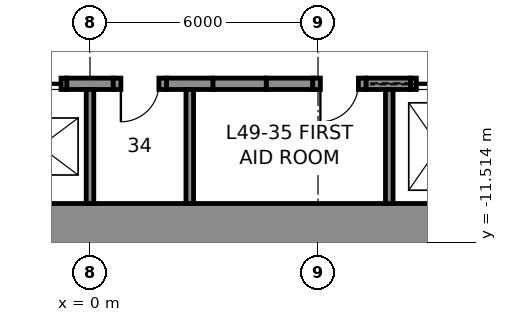
"""IFC4 building model, lengths in metres.
Left out: names, types, materials, properties, quantities, classifications, styles, units other than length and angle.
Written with IfcOpenShell. Run it as: python <this file> out.ifc"""

import sys

from ifc_helpers import new_model, si_unit, direction, frame, frame_2d, origin, place, context, subcontext, project, spatial, rectangle, extrude, element, fill, save


model = new_model("IFC4")
c1 = context("Model", 3, precision=1e-05, world=origin(), true_north=direction((0.0, 1.0)))
c2 = subcontext(c1, "Body", "Model", "MODEL_VIEW")
j1 = project(units=[si_unit("LENGTHUNIT", "METRE"), si_unit("PLANEANGLEUNIT", "RADIAN")], contexts=[c1])
p1 = place(None, origin())
s1 = spatial("IfcSite", under=j1, at=p1, CompositionType="ELEMENT")
p2 = place(p1, origin())
s2 = spatial("IfcBuilding", under=s1, at=p2, CompositionType="ELEMENT")
p3 = place(p2, frame((0.0, 0.0, 225.8)))
s3 = spatial("IfcBuildingStorey", under=s2, at=p3, CompositionType="ELEMENT", Elevation=225.8)
p4 = place(p3, frame((12.0, -11.25, 0.0), z_axis=(0.0, 0.0, 1.0), x_axis=(-1.0, 0.0, 0.0)))
e1 = element("IfcWall", 1, at=p4, inside=s3, PredefinedType="SHEAR", context=c2, shape_type="SweptSolid", body=[
    extrude(rectangle(XDim=24.0, YDim=1.5, at=frame_2d((12.0, 0.0))), origin(), (0.0, 0.0, 1.0), 4.0),
])
for number, where, z_axis, x_axis in (
    (2, (-0.613, -7.35, 0.0), (0.0, 0.0, 1.0), (1.0, 0.0, 0.0)),
    (3, (2.012, -7.35, 0.0), (0.0, 0.0, 1.0), (1.0, 0.0, 0.0)),
    (4, (4.637, -7.35, 0.0), (0.0, 0.0, 1.0), (1.0, 0.0, 0.0)),
):
    element("IfcWall", number, at=place(p3, frame(where, z_axis=z_axis, x_axis=x_axis)), inside=s3, PredefinedType="SHEAR", context=c2, shape_type="SweptSolid", body=[
        extrude(rectangle(XDim=1.225, YDim=0.3, at=frame_2d((0.613, 0.0))), origin(), (0.0, 0.0, 1.0), 4.0),
    ])
p5 = place(p3, frame((7.262, -7.35, 0.0), z_axis=(0.0, 0.0, 1.0), x_axis=(1.0, 0.0, 0.0)))
e5 = element("IfcWall", 5, at=p5, inside=s3, PredefinedType="SHEAR", context=c2, shape_type="SweptSolid", body=[
    extrude(rectangle(XDim=1.175, YDim=0.3, at=frame_2d((0.587, 0.0))), origin(), (0.0, 0.0, 1.0), 4.0),
])
p6 = place(p3, frame((-2.012, -7.35, 0.0), z_axis=(0.0, 0.0, 1.0), x_axis=(1.0, 0.0, 0.0)))
e6 = element("IfcWall", 6, at=p6, inside=s3, PredefinedType="PARTITIONING", context=c2, shape_type="SweptSolid", body=[
    extrude(rectangle(XDim=1.4, YDim=0.3, at=frame_2d((0.7, 0.0))), origin(), (0.0, 0.0, 1.0), 4.0),
])
p7 = place(p6, frame((0.15, 0.0, 0.0)))
e7 = element("IfcOpeningElement", 7, at=p7, cuts=e6, PredefinedType="OPENING", context=c2, shape_type="SweptSolid", body=[
    extrude(rectangle(XDim=1.1, YDim=2.3, at=frame_2d((0.55, 1.15))), frame((0.0, 0.16, 0.0), z_axis=(0.0, -1.0, 0.0), x_axis=(1.0, 0.0, 0.0)), (0.0, 0.0, 1.0), 0.32),
])
p8 = place(p3, frame((0.613, -7.35, 0.0), z_axis=(0.0, 0.0, 1.0), x_axis=(1.0, 0.0, 0.0)))
e8 = element("IfcWall", 8, at=p8, inside=s3, PredefinedType="PARTITIONING", context=c2, shape_type="SweptSolid", body=[
    extrude(rectangle(XDim=1.4, YDim=0.3, at=frame_2d((0.7, 0.0))), origin(), (0.0, 0.0, 1.0), 4.0),
])
p9 = place(p8, frame((0.2, 0.0, 0.0)))
e9 = element("IfcOpeningElement", 9, at=p9, cuts=e8, PredefinedType="OPENING", context=c2, shape_type="SweptSolid", body=[
    extrude(rectangle(XDim=1.0, YDim=2.3, at=frame_2d((0.5, 1.15))), frame((0.0, 0.16, 0.0), z_axis=(0.0, -1.0, 0.0), x_axis=(1.0, 0.0, 0.0)), (0.0, 0.0, 1.0), 0.32),
])
p10 = place(p3, frame((3.238, -7.35, 0.0), z_axis=(0.0, 0.0, 1.0), x_axis=(1.0, 0.0, 0.0)))
e10 = element("IfcWall", 10, at=p10, inside=s3, PredefinedType="PARTITIONING", context=c2, shape_type="SweptSolid", body=[
    extrude(rectangle(XDim=1.4, YDim=0.3, at=frame_2d((0.7, 0.0))), origin(), (0.0, 0.0, 1.0), 4.0),
])
p11 = place(p3, frame((5.863, -7.35, 0.0), z_axis=(0.0, 0.0, 1.0), x_axis=(1.0, 0.0, 0.0)))
e11 = element("IfcWall", 11, at=p11, inside=s3, PredefinedType="PARTITIONING", context=c2, shape_type="SweptSolid", body=[
    extrude(rectangle(XDim=1.4, YDim=0.3, at=frame_2d((0.7, 0.0))), origin(), (0.0, 0.0, 1.0), 4.0),
])
p12 = place(p11, frame((0.2, 0.0, 0.0)))
e12 = element("IfcOpeningElement", 12, at=p12, cuts=e11, PredefinedType="OPENING", context=c2, shape_type="SweptSolid", body=[
    extrude(rectangle(XDim=1.0, YDim=2.3, at=frame_2d((0.5, 1.15))), frame((0.0, 0.16, 0.0), z_axis=(0.0, -1.0, 0.0), x_axis=(1.0, 0.0, 0.0)), (0.0, 0.0, 1.0), 0.32),
])
p13 = place(p3, frame((8.438, -7.35, 0.0), z_axis=(0.0, 0.0, 1.0), x_axis=(1.0, 0.0, 0.0)))
e13 = element("IfcWall", 13, at=p13, inside=s3, PredefinedType="PARTITIONING", context=c2, shape_type="SweptSolid", body=[
    extrude(rectangle(XDim=1.5, YDim=0.3, at=frame_2d((0.75, 0.0))), origin(), (0.0, 0.0, 1.0), 4.0),
])
p14 = place(p13, frame((0.15, 0.0, 0.0)))
e14 = element("IfcOpeningElement", 14, at=p14, cuts=e13, PredefinedType="OPENING", context=c2, shape_type="SweptSolid", body=[
    extrude(rectangle(XDim=1.2, YDim=2.3, at=frame_2d((0.6, 1.15))), frame((0.0, 0.16, 0.0), z_axis=(0.0, -1.0, 0.0), x_axis=(1.0, 0.0, 0.0)), (0.0, 0.0, 1.0), 0.32),
])
for number, where, z_axis, x_axis in (
    (15, (0.0, -10.5, 0.0), (0.0, 0.0, 1.0), (0.0, 1.0, 0.0)),
    (16, (2.625, -10.5, 0.0), (0.0, 0.0, 1.0), (0.0, 1.0, 0.0)),
    (17, (7.875, -10.5, 0.0), (0.0, 0.0, 1.0), (0.0, 1.0, 0.0)),
):
    element("IfcWall", number, at=place(p3, frame(where, z_axis=z_axis, x_axis=x_axis)), inside=s3, PredefinedType="PARTITIONING", context=c2, shape_type="SweptSolid", body=[
        extrude(rectangle(XDim=3.0, YDim=0.2, at=frame_2d((1.5, 0.0))), origin(), (0.0, 0.0, 1.0), 4.0),
    ])
p15 = place(p9, frame((1.0, 0.0, 0.0), z_axis=(0.0, 0.0, 1.0), x_axis=(-1.0, 0.0, 0.0)))
e18 = element("IfcDoor", 18, at=p15, inside=s3, OperationType="SINGLE_SWING_RIGHT", PredefinedType="DOOR", context=c2, shape_type="SweptSolid", body=[
    extrude(rectangle(XDim=1.0, YDim=2.3, at=frame_2d((0.5, 1.15))), frame((0.0, 0.025, 0.0), z_axis=(0.0, -1.0, 0.0), x_axis=(1.0, 0.0, 0.0)), (0.0, 0.0, 1.0), 0.05),
])
fill(e9, e18)
p16 = place(p12, frame((1.0, 0.0, 0.0), z_axis=(0.0, 0.0, 1.0), x_axis=(-1.0, 0.0, 0.0)))
e19 = element("IfcDoor", 19, at=p16, inside=s3, OperationType="SINGLE_SWING_RIGHT", PredefinedType="DOOR", context=c2, shape_type="SweptSolid", body=[
    extrude(rectangle(XDim=1.0, YDim=2.3, at=frame_2d((0.5, 1.15))), frame((0.0, 0.025, 0.0), z_axis=(0.0, -1.0, 0.0), x_axis=(1.0, 0.0, 0.0)), (0.0, 0.0, 1.0), 0.05),
])
fill(e12, e19)
p17 = place(p14, origin())
e20 = element("IfcDoor", 20, at=p17, inside=s3, OperationType="SLIDING_TO_LEFT", PredefinedType="DOOR", context=c2, shape_type="SweptSolid", body=[
    extrude(rectangle(XDim=1.2, YDim=2.3, at=frame_2d((0.6, 1.15))), frame((0.0, 0.025, 0.0), z_axis=(0.0, -1.0, 0.0), x_axis=(1.0, 0.0, 0.0)), (0.0, 0.0, 1.0), 0.05),
])
fill(e14, e20)
p18 = place(p7, origin())
e21 = element("IfcDoor", 21, at=p18, inside=s3, OperationType="SLIDING_TO_LEFT", PredefinedType="DOOR", context=c2, shape_type="SweptSolid", body=[
    extrude(rectangle(XDim=1.1, YDim=2.3, at=frame_2d((0.55, 1.15))), frame((0.0, 0.025, 0.0), z_axis=(0.0, -1.0, 0.0), x_axis=(1.0, 0.0, 0.0)), (0.0, 0.0, 1.0), 0.05),
])
fill(e7, e21)
save(model, sys.argv[1])
